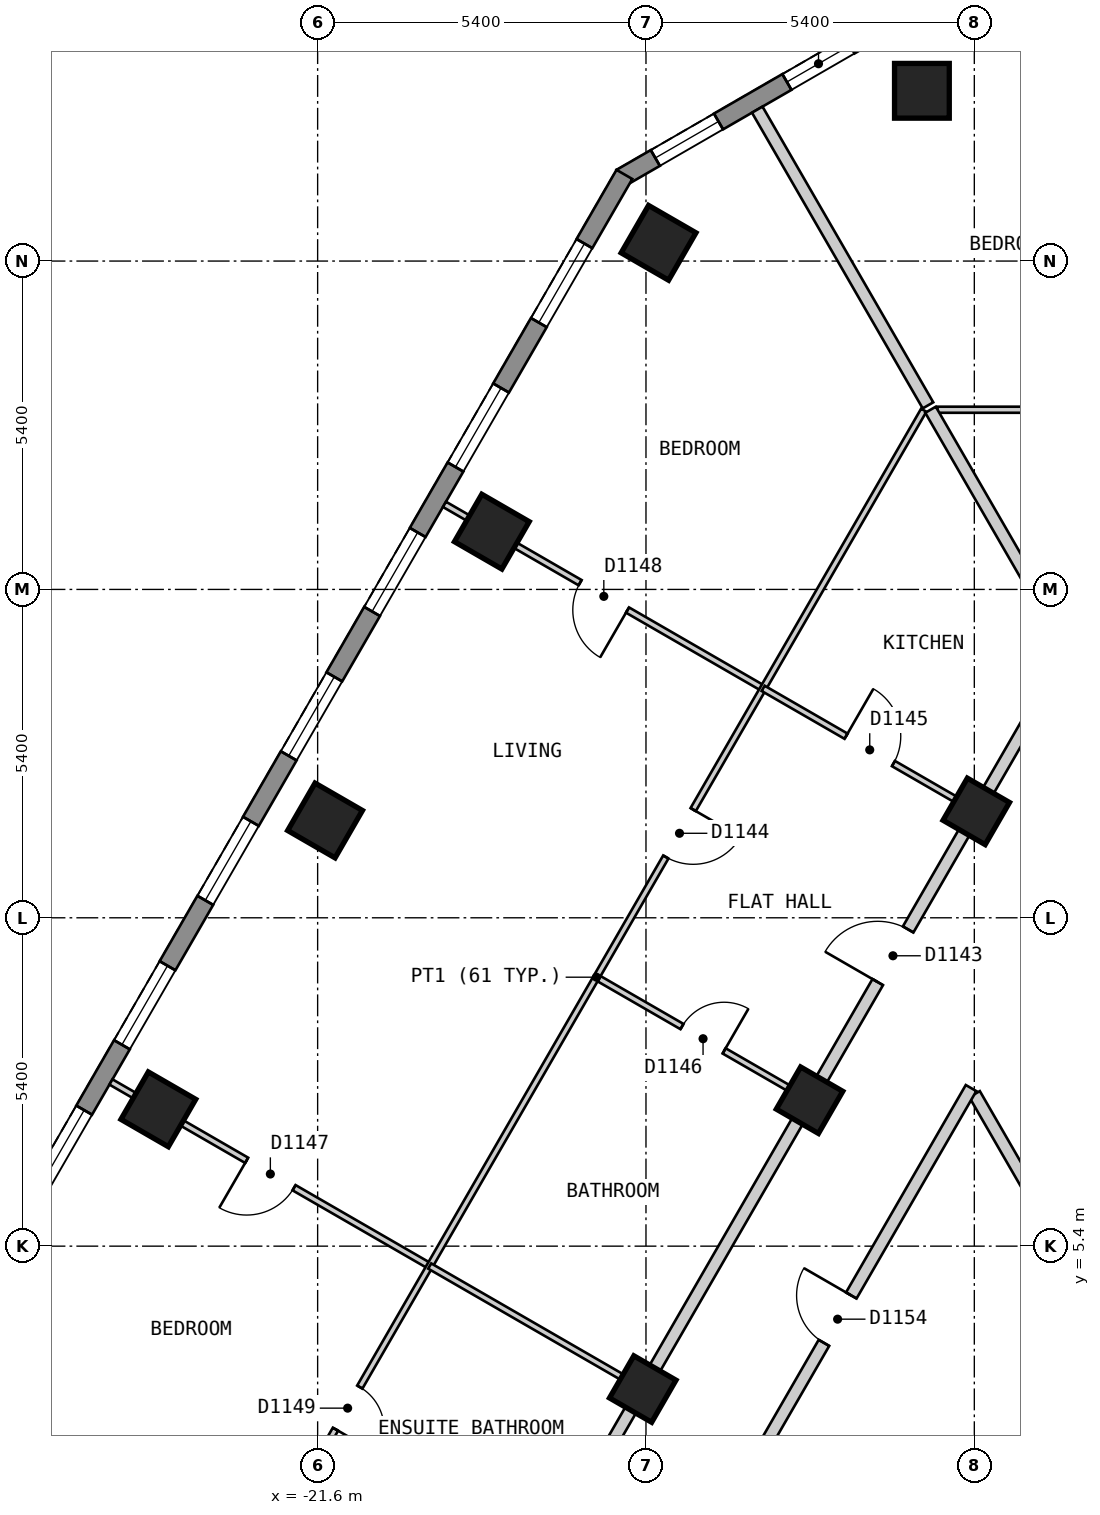
"""IFC4 building model, lengths in metres.
Left out: names, types, materials, properties, quantities, classifications, styles, units other than length and angle.
Written with IfcOpenShell. Run it as: python <this file> out.ifc"""

import sys

from ifc_helpers import new_model, si_unit, direction, frame, frame_2d, origin, origin_2d, place, context, subcontext, project, spatial, polyline, rectangle, outline, extrude, element, fill, save


model = new_model("IFC4")
c1 = context("Model", 3, precision=1e-05, world=origin(), true_north=direction((0.0, 1.0)))
c2 = subcontext(c1, "Body", "Model", "MODEL_VIEW")
j1 = project(units=[si_unit("LENGTHUNIT", "METRE"), si_unit("PLANEANGLEUNIT", "RADIAN")], contexts=[c1])
p1 = place(None, origin())
s1 = spatial("IfcSite", under=j1, at=p1, CompositionType="ELEMENT")
p2 = place(p1, origin())
s2 = spatial("IfcBuilding", under=s1, at=p2, CompositionType="ELEMENT")
p3 = place(p2, frame((0.0, 0.0, 144.6)))
s3 = spatial("IfcBuildingStorey", under=s2, at=p3, CompositionType="ELEMENT", Elevation=144.6)
for number, where, z_axis, x_axis in (
    (1, (-11.662, 24.4, 0.0), (0.0, 0.0, 1.0), (-1.0, 0.0, 0.0)),
    (2, (-15.993, 21.9, 0.0), (0.0, 0.0, 1.0), (-0.5, -0.866, 0.0)),
    (3, (-18.735, 17.15, 0.0), (0.0, 0.0, 1.0), (-0.5, -0.866, 0.0)),
    (4, (-21.478, 12.4, 0.0), (0.0, 0.0, 1.0), (-0.5, -0.866, 0.0)),
    (5, (-24.22, 7.65, 0.0), (0.0, 0.0, 1.0), (-0.5, -0.866, 0.0)),
):
    element("IfcColumn", number, at=place(p3, frame(where, z_axis=z_axis, x_axis=x_axis)), inside=s3, PredefinedType="COLUMN", context=c2, shape_type="SweptSolid", body=[
        extrude(rectangle(XDim=0.9, YDim=0.9, at=origin_2d()), origin(), (0.0, 0.0, 1.0), 3.0),
    ])
for number, where, z_axis, x_axis in (
    (6, (-10.768, 12.55, 0.0), (0.0, 0.0, 1.0), (-0.5, -0.866, 0.0)),
    (7, (-13.51, 7.8, 0.0), (0.0, 0.0, 1.0), (-0.5, -0.866, 0.0)),
    (8, (-16.253, 3.05, 0.0), (0.0, 0.0, 1.0), (-0.5, -0.866, 0.0)),
):
    element("IfcColumn", number, at=place(p3, frame(where, z_axis=z_axis, x_axis=x_axis)), inside=s3, PredefinedType="COLUMN", context=c2, shape_type="SweptSolid", body=[
        extrude(rectangle(XDim=0.8, YDim=0.8, at=origin_2d()), origin(), (0.0, 0.0, 1.0), 3.0),
    ])
p4 = place(p3, frame((-12.28, 25.47, 0.0), z_axis=(0.0, 0.0, 1.0), x_axis=(-0.866022959057, -0.500004234368, 0.0)))
e9 = element("IfcWall", 9, at=p4, inside=s3, PredefinedType="SOLIDWALL", context=c2, shape_type="SweptSolid", body=[
    extrude(outline(polyline([(0.0, -0.15), (5.0, -0.15), (4.92, 0.15), (0.08, 0.15), (0.0, -0.15)])), origin(), (0.0, 0.0, 1.0), 2.7),
])
p5 = place(p4, frame((0.65, 0.0, 0.15)))
e10 = element("IfcOpeningElement", 10, at=p5, cuts=e9, PredefinedType="OPENING", context=c2, shape_type="SweptSolid", body=[
    extrude(rectangle(XDim=1.2, YDim=2.1, at=frame_2d((0.6, 1.05))), frame((0.0, 0.16, 0.0), z_axis=(0.0, -1.0, 0.0), x_axis=(1.0, 0.0, 0.0)), (0.0, 0.0, 1.0), 0.32),
])
p6 = place(p4, frame((3.149, 0.0, 0.15)))
e11 = element("IfcOpeningElement", 11, at=p6, cuts=e9, PredefinedType="OPENING", context=c2, shape_type="SweptSolid", body=[
    extrude(rectangle(XDim=1.2, YDim=2.1, at=frame_2d((0.6, 1.05))), frame((0.0, 0.16, 0.0), z_axis=(0.0, -1.0, 0.0), x_axis=(1.0, 0.0, 0.0)), (0.0, 0.0, 1.0), 0.32),
])
p7 = place(p3, frame((-16.555, 23.025, 0.0), z_axis=(0.0, 0.0, 1.0), x_axis=(-0.500020536353, -0.866013546791, 0.0)))
e12 = element("IfcWall", 12, at=p7, inside=s3, PredefinedType="SOLIDWALL", context=c2, shape_type="SweptSolid", body=[
    extrude(outline(polyline([(0.0, -0.15), (23.325, -0.15), (23.245, 0.15), (0.08, 0.15), (0.0, -0.15)])), origin(), (0.0, 0.0, 1.0), 2.7),
])
p8 = place(p7, frame((1.314, 0.0, 0.15)))
e13 = element("IfcOpeningElement", 13, at=p8, cuts=e12, PredefinedType="OPENING", context=c2, shape_type="SweptSolid", body=[
    extrude(rectangle(XDim=1.5, YDim=2.1, at=frame_2d((0.75, 1.05))), frame((0.0, 0.16, 0.0), z_axis=(0.0, -1.0, 0.0), x_axis=(1.0, 0.0, 0.0)), (0.0, 0.0, 1.0), 0.32),
])
p9 = place(p7, frame((4.056, 0.0, 0.15)))
e14 = element("IfcOpeningElement", 14, at=p9, cuts=e12, PredefinedType="OPENING", context=c2, shape_type="SweptSolid", body=[
    extrude(rectangle(XDim=1.5, YDim=2.1, at=frame_2d((0.75, 1.05))), frame((0.0, 0.16, 0.0), z_axis=(0.0, -1.0, 0.0), x_axis=(1.0, 0.0, 0.0)), (0.0, 0.0, 1.0), 0.32),
])
p10 = place(p7, frame((6.799, 0.0, 0.15)))
e15 = element("IfcOpeningElement", 15, at=p10, cuts=e12, PredefinedType="OPENING", context=c2, shape_type="SweptSolid", body=[
    extrude(rectangle(XDim=1.5, YDim=2.1, at=frame_2d((0.75, 1.05))), frame((0.0, 0.16, 0.0), z_axis=(0.0, -1.0, 0.0), x_axis=(1.0, 0.0, 0.0)), (0.0, 0.0, 1.0), 0.32),
])
p11 = place(p7, frame((9.541, 0.0, 0.15)))
e16 = element("IfcOpeningElement", 16, at=p11, cuts=e12, PredefinedType="OPENING", context=c2, shape_type="SweptSolid", body=[
    extrude(rectangle(XDim=1.5, YDim=2.1, at=frame_2d((0.75, 1.05))), frame((0.0, 0.16, 0.0), z_axis=(0.0, -1.0, 0.0), x_axis=(1.0, 0.0, 0.0)), (0.0, 0.0, 1.0), 0.32),
])
p12 = place(p7, frame((12.285, 0.0, 0.15)))
e17 = element("IfcOpeningElement", 17, at=p12, cuts=e12, PredefinedType="OPENING", context=c2, shape_type="SweptSolid", body=[
    extrude(rectangle(XDim=1.5, YDim=2.1, at=frame_2d((0.75, 1.05))), frame((0.0, 0.16, 0.0), z_axis=(0.0, -1.0, 0.0), x_axis=(1.0, 0.0, 0.0)), (0.0, 0.0, 1.0), 0.32),
])
p13 = place(p7, frame((15.027, 0.0, 0.15)))
e18 = element("IfcOpeningElement", 18, at=p13, cuts=e12, PredefinedType="OPENING", context=c2, shape_type="SweptSolid", body=[
    extrude(rectangle(XDim=1.5, YDim=2.1, at=frame_2d((0.75, 1.05))), frame((0.0, 0.16, 0.0), z_axis=(0.0, -1.0, 0.0), x_axis=(1.0, 0.0, 0.0)), (0.0, 0.0, 1.0), 0.32),
])
p14 = place(p7, frame((17.769, 0.0, 0.15)))
e19 = element("IfcOpeningElement", 19, at=p14, cuts=e12, PredefinedType="OPENING", context=c2, shape_type="SweptSolid", body=[
    extrude(rectangle(XDim=1.5, YDim=2.1, at=frame_2d((0.75, 1.05))), frame((0.0, 0.16, 0.0), z_axis=(0.0, -1.0, 0.0), x_axis=(1.0, 0.0, 0.0)), (0.0, 0.0, 1.0), 0.32),
])
p15 = place(p7, frame((20.512, 0.0, 0.15)))
e20 = element("IfcOpeningElement", 20, at=p15, cuts=e12, PredefinedType="OPENING", context=c2, shape_type="SweptSolid", body=[
    extrude(rectangle(XDim=1.5, YDim=2.1, at=frame_2d((0.75, 1.05))), frame((0.0, 0.16, 0.0), z_axis=(0.0, -1.0, 0.0), x_axis=(1.0, 0.0, 0.0)), (0.0, 0.0, 1.0), 0.32),
])
p16 = place(p3, frame((-10.796, 7.9, 0.0), z_axis=(0.0, 0.0, 1.0), x_axis=(0.499954271211, -0.866051803703, 0.0)))
e21 = element("IfcWall", 21, at=p16, inside=s3, PredefinedType="PARTITIONING", context=c2, shape_type="SweptSolid", body=[
    extrude(rectangle(XDim=7.536, YDim=0.2, at=frame_2d((3.768, 0.0))), origin(), (0.0, 0.0, 1.0), 2.7),
])
p17 = place(p3, frame((-15.242, 0.399, 0.0), z_axis=(0.0, 0.0, 1.0), x_axis=(0.499953615651, 0.866052182145, 0.0)))
e22 = element("IfcWall", 22, at=p17, inside=s3, PredefinedType="PARTITIONING", context=c2, shape_type="SweptSolid", body=[
    extrude(rectangle(XDim=8.777, YDim=0.2, at=frame_2d((4.388, 0.0))), origin(), (0.0, 0.0, 1.0), 2.7),
])
p18 = place(p17, frame((3.938, 0.0, 0.0)))
e23 = element("IfcOpeningElement", 23, at=p18, cuts=e22, PredefinedType="OPENING", context=c2, shape_type="SweptSolid", body=[
    extrude(rectangle(XDim=0.9, YDim=2.1, at=frame_2d((0.45, 1.05))), frame((0.0, 0.11, 0.0), z_axis=(0.0, -1.0, 0.0), x_axis=(1.0, 0.0, 0.0)), (0.0, 0.0, 1.0), 0.22),
])
p19 = place(p3, frame((-17.724, 0.5, 0.0), z_axis=(0.0, 0.0, 1.0), x_axis=(0.499992388462, 0.866029798263, 0.0)))
e24 = element("IfcWall", 24, at=p19, inside=s3, PredefinedType="PARTITIONING", context=c2, shape_type="SweptSolid", body=[
    extrude(rectangle(XDim=16.859, YDim=0.2, at=frame_2d((8.429, 0.0))), origin(), (0.0, 0.0, 1.0), 2.7),
])
p20 = place(p19, frame((10.672, 0.0, 0.0)))
e25 = element("IfcOpeningElement", 25, at=p20, cuts=e24, PredefinedType="OPENING", context=c2, shape_type="SweptSolid", body=[
    extrude(rectangle(XDim=1.0, YDim=2.1, at=frame_2d((0.5, 1.05))), frame((0.0, 0.11, 0.0), z_axis=(0.0, -1.0, 0.0), x_axis=(1.0, 0.0, 0.0)), (0.0, 0.0, 1.0), 0.22),
])
p21 = place(p3, frame((-24.999, 8.1, 0.0), z_axis=(0.0, 0.0, 1.0), x_axis=(0.865978029808, -0.500082045158, 0.0)))
e26 = element("IfcWall", 26, at=p21, inside=s3, PredefinedType="PARTITIONING", context=c2, shape_type="SweptSolid", body=[
    extrude(rectangle(XDim=6.053, YDim=0.1, at=frame_2d((3.027, 0.0))), origin(), (0.0, 0.0, 1.0), 2.7),
])
p22 = place(p21, frame((2.577, 0.0, 0.0)))
e27 = element("IfcOpeningElement", 27, at=p22, cuts=e26, PredefinedType="OPENING", context=c2, shape_type="SweptSolid", body=[
    extrude(rectangle(XDim=0.9, YDim=2.1, at=frame_2d((0.45, 1.05))), frame((0.0, 0.06, 0.0), z_axis=(0.0, -1.0, 0.0), x_axis=(1.0, 0.0, 0.0)), (0.0, 0.0, 1.0), 0.12),
])
p23 = place(p3, frame((-16.971, 9.798, 0.0), z_axis=(0.0, 0.0, 1.0), x_axis=(0.866087525071, -0.499892387336, 0.0)))
e28 = element("IfcWall", 28, at=p23, inside=s3, PredefinedType="PARTITIONING", context=c2, shape_type="SweptSolid", body=[
    extrude(rectangle(XDim=3.897, YDim=0.1, at=frame_2d((1.948, 0.0))), origin(), (0.0, 0.0, 1.0), 2.7),
])
p24 = place(p23, frame((1.574, 0.0, 0.0)))
e29 = element("IfcOpeningElement", 29, at=p24, cuts=e28, PredefinedType="OPENING", context=c2, shape_type="SweptSolid", body=[
    extrude(rectangle(XDim=0.8, YDim=2.1, at=frame_2d((0.4, 1.05))), frame((0.0, 0.06, 0.0), z_axis=(0.0, -1.0, 0.0), x_axis=(1.0, 0.0, 0.0)), (0.0, 0.0, 1.0), 0.12),
])
p25 = place(p3, frame((-19.514, 17.599, 0.0), z_axis=(0.0, 0.0, 1.0), x_axis=(0.866007554612, -0.500030914399, 0.0)))
e30 = element("IfcWall", 30, at=p25, inside=s3, PredefinedType="PARTITIONING", context=c2, shape_type="SweptSolid", body=[
    extrude(rectangle(XDim=6.052, YDim=0.1, at=frame_2d((3.026, 0.0))), origin(), (0.0, 0.0, 1.0), 2.7),
])
p26 = place(p25, frame((2.576, 0.0, 0.0)))
e31 = element("IfcOpeningElement", 31, at=p26, cuts=e30, PredefinedType="OPENING", context=c2, shape_type="SweptSolid", body=[
    extrude(rectangle(XDim=0.9, YDim=2.1, at=frame_2d((0.45, 1.05))), frame((0.0, 0.06, 0.0), z_axis=(0.0, -1.0, 0.0), x_axis=(1.0, 0.0, 0.0)), (0.0, 0.0, 1.0), 0.12),
])
p27 = place(p3, frame((-11.405, 19.155, 0.0), z_axis=(0.0, 0.0, 1.0), x_axis=(1.0, 0.0, 0.0)))
e32 = element("IfcWall", 32, at=p27, inside=s3, PredefinedType="PARTITIONING", context=c2, shape_type="SweptSolid", body=[
    extrude(rectangle(XDim=2.367, YDim=0.1, at=frame_2d((1.184, 0.0))), origin(), (0.0, 0.0, 1.0), 2.7),
])
p28 = place(p3, frame((-22.398, 0.499, 0.0), z_axis=(0.0, 0.0, 1.0), x_axis=(0.499981561717, 0.866036048871, 0.0)))
e33 = element("IfcWall", 33, at=p28, inside=s3, PredefinedType="PARTITIONING", context=c2, shape_type="SweptSolid", body=[
    extrude(rectangle(XDim=21.532, YDim=0.1, at=frame_2d((10.766, 0.0))), origin(), (0.0, 0.0, 1.0), 2.7),
])
p29 = place(p28, frame((13.049, 0.0, 0.0)))
e34 = element("IfcOpeningElement", 34, at=p29, cuts=e33, PredefinedType="OPENING", context=c2, shape_type="SweptSolid", body=[
    extrude(rectangle(XDim=0.9, YDim=2.1, at=frame_2d((0.45, 1.05))), frame((0.0, 0.06, 0.0), z_axis=(0.0, -1.0, 0.0), x_axis=(1.0, 0.0, 0.0)), (0.0, 0.0, 1.0), 0.12),
])
p30 = place(p28, frame((2.183, 0.0, 0.0)))
e35 = element("IfcOpeningElement", 35, at=p30, cuts=e33, PredefinedType="OPENING", context=c2, shape_type="SweptSolid", body=[
    extrude(rectangle(XDim=0.8, YDim=2.1, at=frame_2d((0.4, 1.05))), frame((0.0, 0.06, 0.0), z_axis=(0.0, -1.0, 0.0), x_axis=(1.0, 0.0, 0.0)), (0.0, 0.0, 1.0), 0.12),
])
p31 = place(p3, frame((-14.37, 24.09, 0.0), z_axis=(0.0, 0.0, 1.0), x_axis=(0.500057386422, -0.865992269183, 0.0)))
e36 = element("IfcWall", 36, at=p31, inside=s3, PredefinedType="PARTITIONING", context=c2, shape_type="SweptSolid", body=[
    extrude(rectangle(XDim=5.615, YDim=0.2, at=frame_2d((2.808, 0.0))), origin(), (0.0, 0.0, 1.0), 2.7),
])
p32 = place(p3, frame((-11.52, 19.155, 0.0), z_axis=(0.0, 0.0, 1.0), x_axis=(0.499916824138, -0.866073420066, 0.0)))
e37 = element("IfcWall", 37, at=p32, inside=s3, PredefinedType="PARTITIONING", context=c2, shape_type="SweptSolid", body=[
    extrude(rectangle(XDim=4.567, YDim=0.2, at=frame_2d((2.283, 0.0))), origin(), (0.0, 0.0, 1.0), 2.7),
])
p33 = place(p3, frame((-19.757, 5.073, 0.0), z_axis=(0.0, 0.0, 1.0), x_axis=(0.866076396086, -0.499911668341, 0.0)))
e38 = element("IfcWall", 38, at=p33, inside=s3, PredefinedType="PARTITIONING", context=c2, shape_type="SweptSolid", body=[
    extrude(rectangle(XDim=3.947, YDim=0.1, at=frame_2d((1.973, 0.0))), origin(), (0.0, 0.0, 1.0), 2.7),
])
p34 = place(p3, frame((-14.273, 14.573, 0.0), z_axis=(0.0, 0.0, 1.0), x_axis=(0.866138216955, -0.499804550929, 0.0)))
e39 = element("IfcWall", 39, at=p34, inside=s3, PredefinedType="PARTITIONING", context=c2, shape_type="SweptSolid", body=[
    extrude(rectangle(XDim=3.947, YDim=0.1, at=frame_2d((1.974, 0.0))), origin(), (0.0, 0.0, 1.0), 2.7),
])
p35 = place(p34, frame((1.574, 0.0, 0.0)))
e40 = element("IfcOpeningElement", 40, at=p35, cuts=e39, PredefinedType="OPENING", context=c2, shape_type="SweptSolid", body=[
    extrude(rectangle(XDim=0.9, YDim=2.1, at=frame_2d((0.45, 1.05))), frame((0.0, 0.06, 0.0), z_axis=(0.0, -1.0, 0.0), x_axis=(1.0, 0.0, 0.0)), (0.0, 0.0, 1.0), 0.12),
])
p36 = place(p5, origin())
e41 = element("IfcWindow", 41, at=p36, inside=s3, PartitioningType="SINGLE_PANEL", PredefinedType="WINDOW", context=c2, shape_type="SweptSolid", body=[
    extrude(rectangle(XDim=1.2, YDim=2.1, at=frame_2d((0.6, 1.05))), frame((0.0, 0.03, 0.0), z_axis=(0.0, -1.0, 0.0), x_axis=(1.0, 0.0, 0.0)), (0.0, 0.0, 1.0), 0.06),
])
fill(e10, e41)
p37 = place(p6, origin())
e42 = element("IfcWindow", 42, at=p37, inside=s3, PartitioningType="SINGLE_PANEL", PredefinedType="WINDOW", context=c2, shape_type="SweptSolid", body=[
    extrude(rectangle(XDim=1.2, YDim=2.1, at=frame_2d((0.6, 1.05))), frame((0.0, 0.03, 0.0), z_axis=(0.0, -1.0, 0.0), x_axis=(1.0, 0.0, 0.0)), (0.0, 0.0, 1.0), 0.06),
])
fill(e11, e42)
p38 = place(p8, origin())
e43 = element("IfcWindow", 43, at=p38, inside=s3, PartitioningType="SINGLE_PANEL", PredefinedType="WINDOW", context=c2, shape_type="SweptSolid", body=[
    extrude(rectangle(XDim=1.5, YDim=2.1, at=frame_2d((0.75, 1.05))), frame((0.0, 0.03, 0.0), z_axis=(0.0, -1.0, 0.0), x_axis=(1.0, 0.0, 0.0)), (0.0, 0.0, 1.0), 0.06),
])
fill(e13, e43)
p39 = place(p9, origin())
e44 = element("IfcWindow", 44, at=p39, inside=s3, PartitioningType="SINGLE_PANEL", PredefinedType="WINDOW", context=c2, shape_type="SweptSolid", body=[
    extrude(rectangle(XDim=1.5, YDim=2.1, at=frame_2d((0.75, 1.05))), frame((0.0, 0.03, 0.0), z_axis=(0.0, -1.0, 0.0), x_axis=(1.0, 0.0, 0.0)), (0.0, 0.0, 1.0), 0.06),
])
fill(e14, e44)
p40 = place(p10, origin())
e45 = element("IfcWindow", 45, at=p40, inside=s3, PartitioningType="SINGLE_PANEL", PredefinedType="WINDOW", context=c2, shape_type="SweptSolid", body=[
    extrude(rectangle(XDim=1.5, YDim=2.1, at=frame_2d((0.75, 1.05))), frame((0.0, 0.03, 0.0), z_axis=(0.0, -1.0, 0.0), x_axis=(1.0, 0.0, 0.0)), (0.0, 0.0, 1.0), 0.06),
])
fill(e15, e45)
p41 = place(p11, origin())
e46 = element("IfcWindow", 46, at=p41, inside=s3, PartitioningType="SINGLE_PANEL", PredefinedType="WINDOW", context=c2, shape_type="SweptSolid", body=[
    extrude(rectangle(XDim=1.5, YDim=2.1, at=frame_2d((0.75, 1.05))), frame((0.0, 0.03, 0.0), z_axis=(0.0, -1.0, 0.0), x_axis=(1.0, 0.0, 0.0)), (0.0, 0.0, 1.0), 0.06),
])
fill(e16, e46)
p42 = place(p12, origin())
e47 = element("IfcWindow", 47, at=p42, inside=s3, PartitioningType="SINGLE_PANEL", PredefinedType="WINDOW", context=c2, shape_type="SweptSolid", body=[
    extrude(rectangle(XDim=1.5, YDim=2.1, at=frame_2d((0.75, 1.05))), frame((0.0, 0.03, 0.0), z_axis=(0.0, -1.0, 0.0), x_axis=(1.0, 0.0, 0.0)), (0.0, 0.0, 1.0), 0.06),
])
fill(e17, e47)
p43 = place(p13, origin())
e48 = element("IfcWindow", 48, at=p43, inside=s3, PartitioningType="SINGLE_PANEL", PredefinedType="WINDOW", context=c2, shape_type="SweptSolid", body=[
    extrude(rectangle(XDim=1.5, YDim=2.1, at=frame_2d((0.75, 1.05))), frame((0.0, 0.03, 0.0), z_axis=(0.0, -1.0, 0.0), x_axis=(1.0, 0.0, 0.0)), (0.0, 0.0, 1.0), 0.06),
])
fill(e18, e48)
p44 = place(p14, origin())
e49 = element("IfcWindow", 49, at=p44, inside=s3, PartitioningType="SINGLE_PANEL", PredefinedType="WINDOW", context=c2, shape_type="SweptSolid", body=[
    extrude(rectangle(XDim=1.5, YDim=2.1, at=frame_2d((0.75, 1.05))), frame((0.0, 0.03, 0.0), z_axis=(0.0, -1.0, 0.0), x_axis=(1.0, 0.0, 0.0)), (0.0, 0.0, 1.0), 0.06),
])
fill(e19, e49)
p45 = place(p20, origin())
e50 = element("IfcDoor", 50, at=p45, inside=s3, OperationType="SINGLE_SWING_LEFT", PredefinedType="DOOR", context=c2, shape_type="SweptSolid", body=[
    extrude(rectangle(XDim=1.0, YDim=2.1, at=frame_2d((0.5, 1.05))), frame((0.0, 0.025, 0.0), z_axis=(0.0, -1.0, 0.0), x_axis=(1.0, 0.0, 0.0)), (0.0, 0.0, 1.0), 0.05),
])
fill(e25, e50)
p46 = place(p29, origin())
e51 = element("IfcDoor", 51, at=p46, inside=s3, OperationType="SINGLE_SWING_RIGHT", PredefinedType="DOOR", context=c2, shape_type="SweptSolid", body=[
    extrude(rectangle(XDim=0.9, YDim=2.1, at=frame_2d((0.45, 1.05))), frame((0.0, 0.025, 0.0), z_axis=(0.0, -1.0, 0.0), x_axis=(1.0, 0.0, 0.0)), (0.0, 0.0, 1.0), 0.05),
])
fill(e34, e51)
p47 = place(p35, origin())
e52 = element("IfcDoor", 52, at=p47, inside=s3, OperationType="SINGLE_SWING_LEFT", PredefinedType="DOOR", context=c2, shape_type="SweptSolid", body=[
    extrude(rectangle(XDim=0.9, YDim=2.1, at=frame_2d((0.45, 1.05))), frame((0.0, 0.025, 0.0), z_axis=(0.0, -1.0, 0.0), x_axis=(1.0, 0.0, 0.0)), (0.0, 0.0, 1.0), 0.05),
])
fill(e40, e52)
p48 = place(p24, origin())
e53 = element("IfcDoor", 53, at=p48, inside=s3, OperationType="SINGLE_SWING_RIGHT", PredefinedType="DOOR", context=c2, shape_type="SweptSolid", body=[
    extrude(rectangle(XDim=0.8, YDim=2.1, at=frame_2d((0.4, 1.05))), frame((0.0, 0.025, 0.0), z_axis=(0.0, -1.0, 0.0), x_axis=(1.0, 0.0, 0.0)), (0.0, 0.0, 1.0), 0.05),
])
fill(e29, e53)
p49 = place(p22, origin())
e54 = element("IfcDoor", 54, at=p49, inside=s3, OperationType="SINGLE_SWING_LEFT", PredefinedType="DOOR", context=c2, shape_type="SweptSolid", body=[
    extrude(rectangle(XDim=0.9, YDim=2.1, at=frame_2d((0.45, 1.05))), frame((0.0, 0.025, 0.0), z_axis=(0.0, -1.0, 0.0), x_axis=(1.0, 0.0, 0.0)), (0.0, 0.0, 1.0), 0.05),
])
fill(e27, e54)
p50 = place(p26, origin())
e55 = element("IfcDoor", 55, at=p50, inside=s3, OperationType="SINGLE_SWING_RIGHT", PredefinedType="DOOR", context=c2, shape_type="SweptSolid", body=[
    extrude(rectangle(XDim=0.9, YDim=2.1, at=frame_2d((0.45, 1.05))), frame((0.0, 0.025, 0.0), z_axis=(0.0, -1.0, 0.0), x_axis=(1.0, 0.0, 0.0)), (0.0, 0.0, 1.0), 0.05),
])
fill(e31, e55)
p51 = place(p30, origin())
e56 = element("IfcDoor", 56, at=p51, inside=s3, OperationType="SINGLE_SWING_LEFT", PredefinedType="DOOR", context=c2, shape_type="SweptSolid", body=[
    extrude(rectangle(XDim=0.8, YDim=2.1, at=frame_2d((0.4, 1.05))), frame((0.0, 0.025, 0.0), z_axis=(0.0, -1.0, 0.0), x_axis=(1.0, 0.0, 0.0)), (0.0, 0.0, 1.0), 0.05),
])
fill(e35, e56)
p52 = place(p18, origin())
e57 = element("IfcDoor", 57, at=p52, inside=s3, OperationType="SINGLE_SWING_RIGHT", PredefinedType="DOOR", context=c2, shape_type="SweptSolid", body=[
    extrude(rectangle(XDim=0.9, YDim=2.1, at=frame_2d((0.45, 1.05))), frame((0.0, 0.025, 0.0), z_axis=(0.0, -1.0, 0.0), x_axis=(1.0, 0.0, 0.0)), (0.0, 0.0, 1.0), 0.05),
])
fill(e23, e57)
save(model, sys.argv[1])
